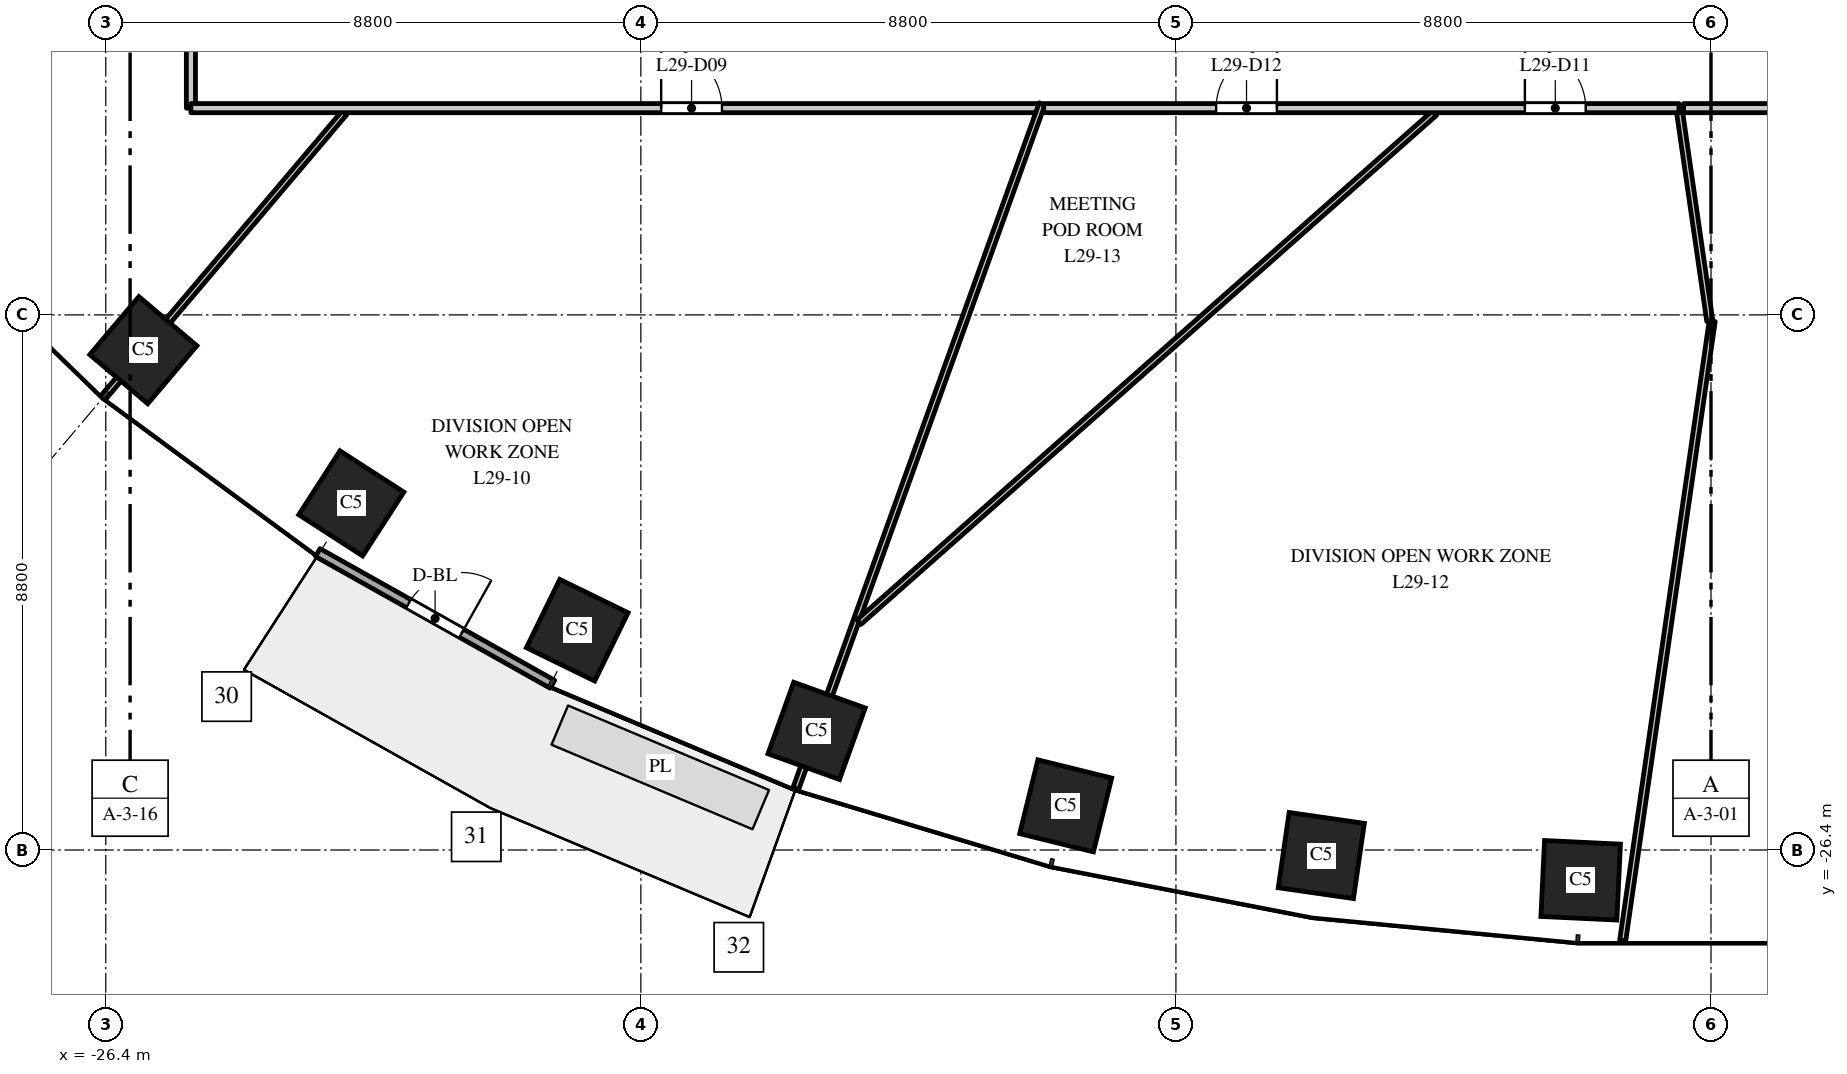
"""IFC4 building model, lengths in metres.
Left out: names, types, materials, properties, quantities, classifications, styles, units other than length and angle.
Written with IfcOpenShell. Run it as: python <this file> out.ifc"""

import sys

from ifc_helpers import new_model, si_unit, direction, frame, frame_2d, origin, origin_2d, place, context, subcontext, project, spatial, rectangle, extrude, element, fill, save


model = new_model("IFC4")
c1 = context("Model", 3, precision=1e-05, world=origin(), true_north=direction((0.0, 1.0)))
c2 = subcontext(c1, "Body", "Model", "MODEL_VIEW")
j1 = project(units=[si_unit("LENGTHUNIT", "METRE"), si_unit("PLANEANGLEUNIT", "RADIAN")], contexts=[c1])
p1 = place(None, origin())
s1 = spatial("IfcSite", under=j1, at=p1, CompositionType="ELEMENT")
p2 = place(p1, origin())
s2 = spatial("IfcBuilding", under=s1, at=p2, CompositionType="ELEMENT")
p3 = place(p2, frame((0.0, 0.0, 128.0)))
s3 = spatial("IfcBuildingStorey", under=s2, at=p3, CompositionType="ELEMENT", Elevation=128.0)
for number, where, z_axis, x_axis in (
    (1, (-25.783, -18.18, 0.0), (0.0, 0.0, 1.0), (0.763, -0.646, 0.0)),
    (2, (-22.362, -20.7, 0.0), (0.0, 0.0, 1.0), (0.84, -0.542, 0.0)),
    (3, (-18.646, -22.785, 0.0), (0.0, 0.0, 1.0), (0.898, -0.439, 0.0)),
    (4, (-14.709, -24.441, 0.0), (0.0, 0.0, 1.0), (0.941, -0.338, 0.0)),
    (5, (-10.613, -25.674, 0.0), (0.0, 0.0, 1.0), (0.971, -0.24, 0.0)),
    (6, (-6.409, -26.491, 0.0), (0.0, 0.0, 1.0), (0.99, -0.143, 0.0)),
    (7, (-2.143, -26.898, 0.0), (0.0, 0.0, 1.0), (0.999, -0.048, 0.0)),
):
    element("IfcColumn", number, at=place(p3, frame(where, z_axis=z_axis, x_axis=x_axis)), inside=s3, PredefinedType="COLUMN", context=c2, shape_type="SweptSolid", body=[
        extrude(rectangle(XDim=1.25, YDim=1.25, at=origin_2d()), origin(), (0.0, 0.0, 1.0), 4.0),
    ])
p4 = place(p3, frame((-22.913, -21.509, 0.0), z_axis=(0.0, 0.0, 1.0), x_axis=(0.872046572975, -0.489422899509, 0.0)))
e8 = element("IfcWall", 8, at=p4, inside=s3, PredefinedType="STANDARD", context=c2, shape_type="SweptSolid", body=[
    extrude(rectangle(XDim=4.426, YDim=0.15, at=frame_2d((2.213, 0.0))), origin(), (0.0, 0.0, 1.0), 3.7),
])
p5 = place(p4, frame((1.713, 0.0, 0.0)))
e9 = element("IfcOpeningElement", 9, at=p5, cuts=e8, PredefinedType="OPENING", context=c2, shape_type="SweptSolid", body=[
    extrude(rectangle(XDim=1.0, YDim=2.4, at=frame_2d((0.5, 1.2))), frame((0.0, 0.085, 0.0), z_axis=(0.0, -1.0, 0.0), x_axis=(1.0, 0.0, 0.0)), (0.0, 0.0, 1.0), 0.17),
])
p6 = place(p3, frame((-26.43, -18.945, 0.0), z_axis=(0.0, 0.0, 1.0), x_axis=(0.646335552338, 0.763053309923, 0.0)))
e10 = element("IfcWall", 10, at=p6, inside=s3, PredefinedType="PARTITIONING", context=c2, shape_type="SweptSolid", body=[
    extrude(rectangle(XDim=6.12, YDim=0.1, at=frame_2d((3.06, 0.0))), origin(), (0.0, 0.0, 1.0), 3.7),
])
p7 = place(p3, frame((-25.0, -14.2, 0.0), z_axis=(0.0, 0.0, 1.0), x_axis=(0.0, 1.0, 0.0)))
e11 = element("IfcWall", 11, at=p7, inside=s3, PredefinedType="PARTITIONING", context=c2, shape_type="SweptSolid", body=[
    extrude(rectangle(XDim=2.4, YDim=0.15, at=frame_2d((1.2, 0.0))), origin(), (0.0, 0.0, 1.0), 3.7),
])
p8 = place(p3, frame((-25.0, -14.2, 0.0), z_axis=(0.0, 0.0, 1.0), x_axis=(1.0, 0.0, 0.0)))
e12 = element("IfcWall", 12, at=p8, inside=s3, PredefinedType="PARTITIONING", context=c2, shape_type="SweptSolid", body=[
    extrude(rectangle(XDim=13.961, YDim=0.15, at=frame_2d((6.98, 0.0))), origin(), (0.0, 0.0, 1.0), 2.75),
])
p9 = place(p8, frame((7.734, 0.0, 0.0)))
e13 = element("IfcOpeningElement", 13, at=p9, cuts=e12, PredefinedType="OPENING", context=c2, shape_type="SweptSolid", body=[
    extrude(rectangle(XDim=1.0, YDim=2.1, at=frame_2d((0.5, 1.05))), frame((0.0, 0.085, 0.0), z_axis=(0.0, -1.0, 0.0), x_axis=(1.0, 0.0, 0.0)), (0.0, 0.0, 1.0), 0.17),
])
p10 = place(p3, frame((-15.049, -25.383, 0.0), z_axis=(0.0, 0.0, 1.0), x_axis=(0.338467907901, 0.940977935619, 0.0)))
e14 = element("IfcWall", 14, at=p10, inside=s3, PredefinedType="PARTITIONING", context=c2, shape_type="SweptSolid", body=[
    extrude(rectangle(XDim=11.96, YDim=0.1, at=frame_2d((5.98, 0.0))), origin(), (0.0, 0.0, 1.0), 2.9),
])
p11 = place(p3, frame((-14.014, -22.654, 0.0), z_axis=(0.0, 0.0, 1.0), x_axis=(0.749047794047, 0.662515963757, 0.0)))
e15 = element("IfcWall", 15, at=p11, inside=s3, PredefinedType="PARTITIONING", context=c2, shape_type="SweptSolid", body=[
    extrude(rectangle(XDim=12.643, YDim=0.1, at=frame_2d((6.321, 0.0))), origin(), (0.0, 0.0, 1.0), 2.85),
])
p12 = place(p3, frame((-10.974, -14.2, 0.0), z_axis=(0.0, 0.0, 1.0), x_axis=(1.0, 0.0, 0.0)))
e16 = element("IfcWall", 16, at=p12, inside=s3, PredefinedType="PARTITIONING", context=c2, shape_type="SweptSolid", body=[
    extrude(rectangle(XDim=10.447, YDim=0.15, at=frame_2d((5.224, 0.0))), origin(), (0.0, 0.0, 1.0), 2.85),
])
p13 = place(p12, frame((7.913, 0.0, 0.0)))
e17 = element("IfcOpeningElement", 17, at=p13, cuts=e16, PredefinedType="OPENING", context=c2, shape_type="SweptSolid", body=[
    extrude(rectangle(XDim=1.0, YDim=2.1, at=frame_2d((0.5, 1.05))), frame((0.0, 0.085, 0.0), z_axis=(0.0, -1.0, 0.0), x_axis=(1.0, 0.0, 0.0)), (0.0, 0.0, 1.0), 0.17),
])
p14 = place(p12, frame((2.835, 0.0, 0.0)))
e18 = element("IfcOpeningElement", 18, at=p14, cuts=e16, PredefinedType="OPENING", context=c2, shape_type="SweptSolid", body=[
    extrude(rectangle(XDim=1.0, YDim=2.1, at=frame_2d((0.5, 1.05))), frame((0.0, 0.085, 0.0), z_axis=(0.0, -1.0, 0.0), x_axis=(1.0, 0.0, 0.0)), (0.0, 0.0, 1.0), 0.17),
])
p15 = place(p3, frame((-1.453, -27.894, 0.0), z_axis=(0.0, 0.0, 1.0), x_axis=(0.143027592995, 0.989718701269, 0.0)))
e19 = element("IfcWall", 19, at=p15, inside=s3, PredefinedType="PARTITIONING", context=c2, shape_type="SweptSolid", body=[
    extrude(rectangle(XDim=10.298, YDim=0.1, at=frame_2d((5.149, 0.0))), origin(), (0.0, 0.0, 1.0), 2.9),
])
p16 = place(p3, frame((-0.516, -14.271, 0.0), z_axis=(0.0, 0.0, 1.0), x_axis=(0.143107167662, -0.9897071984, 0.0)))
e20 = element("IfcWall", 20, at=p16, inside=s3, PredefinedType="PARTITIONING", context=c2, shape_type="SweptSolid", body=[
    extrude(rectangle(XDim=3.467, YDim=0.1, at=frame_2d((1.733, 0.0))), origin(), (0.0, 0.0, 1.0), 3.7),
])
p17 = place(p3, frame((-0.452, -14.2, 0.0), z_axis=(0.0, 0.0, 1.0), x_axis=(1.0, 0.0, 0.0)))
e21 = element("IfcWall", 21, at=p17, inside=s3, PredefinedType="PARTITIONING", context=c2, shape_type="SweptSolid", body=[
    extrude(rectangle(XDim=5.021, YDim=0.15, at=frame_2d((2.51, 0.0))), origin(), (0.0, 0.0, 1.0), 2.85),
])
p18 = place(p17, frame((2.379, 0.0, 0.0)))
e22 = element("IfcOpeningElement", 22, at=p18, cuts=e21, PredefinedType="OPENING", context=c2, shape_type="SweptSolid", body=[
    extrude(rectangle(XDim=1.0, YDim=2.1, at=frame_2d((0.5, 1.05))), frame((0.0, 0.085, 0.0), z_axis=(0.0, -1.0, 0.0), x_axis=(1.0, 0.0, 0.0)), (0.0, 0.0, 1.0), 0.17),
])
p19 = place(p5, origin())
e23 = element("IfcDoor", 23, at=p19, inside=s3, OperationType="SINGLE_SWING_RIGHT", PredefinedType="DOOR", context=c2, shape_type="SweptSolid", body=[
    extrude(rectangle(XDim=1.0, YDim=2.4, at=frame_2d((0.5, 1.2))), frame((0.0, 0.025, 0.0), z_axis=(0.0, -1.0, 0.0), x_axis=(1.0, 0.0, 0.0)), (0.0, 0.0, 1.0), 0.05),
])
fill(e9, e23)
p20 = place(p9, origin())
e24 = element("IfcDoor", 24, at=p20, inside=s3, OperationType="SINGLE_SWING_LEFT", PredefinedType="DOOR", context=c2, shape_type="SweptSolid", body=[
    extrude(rectangle(XDim=1.0, YDim=2.1, at=frame_2d((0.5, 1.05))), frame((0.0, 0.025, 0.0), z_axis=(0.0, -1.0, 0.0), x_axis=(1.0, 0.0, 0.0)), (0.0, 0.0, 1.0), 0.05),
])
fill(e13, e24)
p21 = place(p13, origin())
e25 = element("IfcDoor", 25, at=p21, inside=s3, OperationType="SINGLE_SWING_LEFT", PredefinedType="DOOR", context=c2, shape_type="SweptSolid", body=[
    extrude(rectangle(XDim=1.0, YDim=2.1, at=frame_2d((0.5, 1.05))), frame((0.0, 0.025, 0.0), z_axis=(0.0, -1.0, 0.0), x_axis=(1.0, 0.0, 0.0)), (0.0, 0.0, 1.0), 0.05),
])
fill(e17, e25)
p22 = place(p14, origin())
e26 = element("IfcDoor", 26, at=p22, inside=s3, OperationType="SINGLE_SWING_RIGHT", PredefinedType="DOOR", context=c2, shape_type="SweptSolid", body=[
    extrude(rectangle(XDim=1.0, YDim=2.1, at=frame_2d((0.5, 1.05))), frame((0.0, 0.025, 0.0), z_axis=(0.0, -1.0, 0.0), x_axis=(1.0, 0.0, 0.0)), (0.0, 0.0, 1.0), 0.05),
])
fill(e18, e26)
save(model, sys.argv[1])
